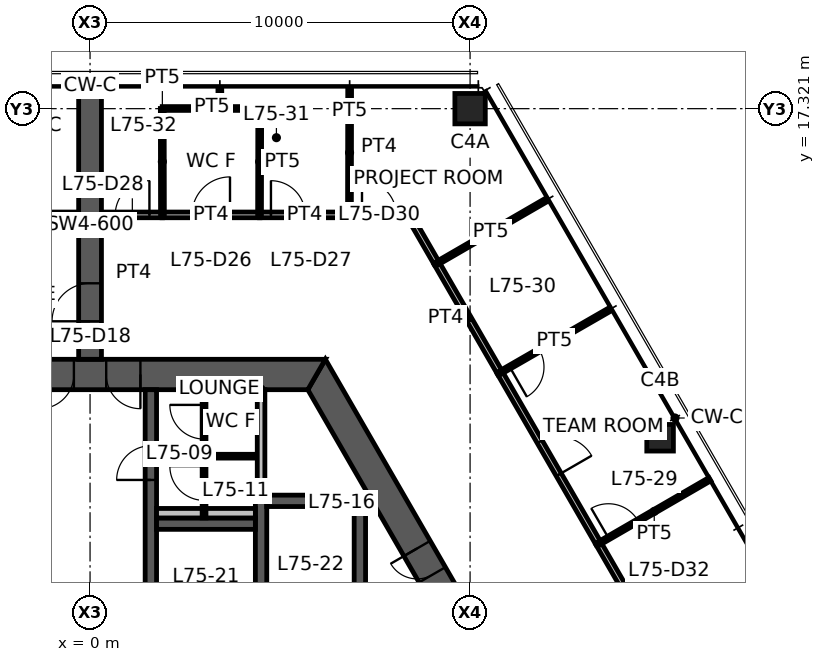
"""IFC4 building model, lengths in metres.
Left out: names, types, materials, properties, quantities, classifications, styles, units other than length and angle.
Written with IfcOpenShell. Run it as: python <this file> out.ifc"""

import sys

from ifc_helpers import new_model, si_unit, direction, frame, frame_2d, origin, origin_2d, place, context, subcontext, project, spatial, polyline, rectangle, hollow_rectangle, outline, extrude, element, fill, save


model = new_model("IFC4")
c1 = context("Model", 3, precision=1e-05, world=origin(), true_north=direction((0.0, 1.0)))
c2 = subcontext(c1, "Body", "Model", "MODEL_VIEW")
j1 = project(units=[si_unit("LENGTHUNIT", "METRE"), si_unit("PLANEANGLEUNIT", "RADIAN")], contexts=[c1])
p1 = place(None, origin())
s1 = spatial("IfcSite", under=j1, at=p1, CompositionType="ELEMENT")
p2 = place(p1, origin())
s2 = spatial("IfcBuilding", under=s1, at=p2, CompositionType="ELEMENT")
p3 = place(p2, frame((0.0, 0.0, 298.6)))
s3 = spatial("IfcBuildingStorey", under=s2, at=p3, CompositionType="ELEMENT", Elevation=298.6)
p4 = place(p3, frame((10.0, 17.321, 0.0), z_axis=(0.0, 0.0, 1.0), x_axis=(1.0, 0.0, 0.0)))
e1 = element("IfcColumn", 1, at=p4, inside=s3, PredefinedType="COLUMN", context=c2, shape_type="SweptSolid", body=[
    extrude(hollow_rectangle(XDim=0.8, YDim=0.8, WallThickness=0.04, at=origin_2d()), origin(), (0.0, 0.0, 1.0), 3.9),
])
p5 = place(p3, frame((15.0, 8.66, 0.0), z_axis=(0.0, 0.0, 1.0), x_axis=(1.0, 0.0, 0.0)))
e2 = element("IfcColumn", 2, at=p5, inside=s3, PredefinedType="COLUMN", context=c2, shape_type="SweptSolid", body=[
    extrude(hollow_rectangle(XDim=0.7, YDim=0.7, WallThickness=0.032, at=origin_2d()), origin(), (0.0, 0.0, 1.0), 3.9),
])
p6 = place(p3, frame((11.922, 0.0, 0.0), z_axis=(0.0, 0.0, 1.0), x_axis=(-0.500004296715, 0.866022923061, 0.0)))
e3 = element("IfcWall", 3, at=p6, inside=s3, PredefinedType="SHEAR", context=c2, shape_type="SweptSolid", body=[
    extrude(outline(polyline([(-0.231, -0.4), (5.835, -0.4), (6.635, -0.4), (12.153, -0.4), (11.691, 0.4), (6.635, 0.4), (5.835, 0.4), (0.231, 0.4), (-0.231, -0.4)])), origin(), (0.0, 0.0, 1.0), 3.9),
])
p7 = place(p6, frame((5.835, 0.0, 0.0)))
e4 = element("IfcOpeningElement", 4, at=p7, cuts=e3, PredefinedType="OPENING", context=c2, shape_type="SweptSolid", body=[
    extrude(rectangle(XDim=0.8, YDim=2.1, at=frame_2d((0.4, 1.05))), frame((0.0, 0.41, 0.0), z_axis=(0.0, -1.0, 0.0), x_axis=(1.0, 0.0, 0.0)), (0.0, 0.0, 1.0), 0.82),
])
p8 = place(p3, frame((5.961, 10.325, 0.0), z_axis=(0.0, 0.0, 1.0), x_axis=(-1.0, 0.0, 0.0)))
e5 = element("IfcWall", 5, at=p8, inside=s3, PredefinedType="SHEAR", context=c2, shape_type="SweptSolid", body=[
    extrude(outline(polyline([(-0.231, -0.4), (4.636, -0.4), (5.536, -0.4), (6.386, -0.4), (7.286, -0.4), (12.153, -0.4), (11.691, 0.4), (7.286, 0.4), (6.386, 0.4), (5.536, 0.4), (4.636, 0.4), (0.231, 0.4), (-0.231, -0.4)])), origin(), (0.0, 0.0, 1.0), 3.9),
])
p9 = place(p8, frame((6.386, 0.0, 0.0)))
e6 = element("IfcOpeningElement", 6, at=p9, cuts=e5, PredefinedType="OPENING", context=c2, shape_type="SweptSolid", body=[
    extrude(rectangle(XDim=0.9, YDim=2.1, at=frame_2d((0.45, 1.05))), frame((0.0, 0.41, 0.0), z_axis=(0.0, -1.0, 0.0), x_axis=(1.0, 0.0, 0.0)), (0.0, 0.0, 1.0), 0.82),
])
p10 = place(p8, frame((4.636, 0.0, 0.0)))
e7 = element("IfcOpeningElement", 7, at=p10, cuts=e5, PredefinedType="OPENING", context=c2, shape_type="SweptSolid", body=[
    extrude(rectangle(XDim=0.9, YDim=2.1, at=frame_2d((0.45, 1.05))), frame((0.0, 0.41, 0.0), z_axis=(0.0, -1.0, 0.0), x_axis=(1.0, 0.0, 0.0)), (0.0, 0.0, 1.0), 0.82),
])
p11 = place(p3, frame((0.0, 10.725, 0.0), z_axis=(0.0, 0.0, 1.0), x_axis=(0.0, 1.0, 0.0)))
e8 = element("IfcWall", 8, at=p11, inside=s3, PredefinedType="SHEAR", context=c2, shape_type="SweptSolid", body=[
    extrude(rectangle(XDim=7.045, YDim=0.6, at=frame_2d((3.523, 0.0))), origin(), (0.0, 0.0, 1.0), 3.9),
])
p12 = place(p11, frame((1.0, 0.0, 0.0)))
e9 = element("IfcOpeningElement", 9, at=p12, cuts=e8, PredefinedType="OPENING", context=c2, shape_type="SweptSolid", body=[
    extrude(rectangle(XDim=1.0, YDim=2.1, at=frame_2d((0.5, 1.05))), frame((0.0, 0.31, 0.0), z_axis=(0.0, -1.0, 0.0), x_axis=(1.0, 0.0, 0.0)), (0.0, 0.0, 1.0), 0.62),
])
p13 = place(p3, frame((1.6, 3.75, 0.0), z_axis=(0.0, 0.0, 1.0), x_axis=(0.0, 1.0, 0.0)))
e10 = element("IfcWall", 10, at=p13, inside=s3, PredefinedType="SHEAR", context=c2, shape_type="SweptSolid", body=[
    extrude(rectangle(XDim=6.175, YDim=0.3, at=frame_2d((3.087, 0.0))), origin(), (0.0, 0.0, 1.0), 3.9),
])
p14 = place(p13, frame((3.8, 0.0, 0.0)))
e11 = element("IfcOpeningElement", 11, at=p14, cuts=e10, PredefinedType="OPENING", context=c2, shape_type="SweptSolid", body=[
    extrude(rectangle(XDim=0.9, YDim=2.1, at=frame_2d((0.45, 1.05))), frame((0.0, 0.16, 0.0), z_axis=(0.0, -1.0, 0.0), x_axis=(1.0, 0.0, 0.0)), (0.0, 0.0, 1.0), 0.32),
])
p15 = place(p3, frame((4.5, 3.75, 0.0), z_axis=(0.0, 0.0, 1.0), x_axis=(0.0, 1.0, 0.0)))
e12 = element("IfcWall", 12, at=p15, inside=s3, PredefinedType="SHEAR", context=c2, shape_type="SweptSolid", body=[
    extrude(rectangle(XDim=3.4, YDim=0.3, at=frame_2d((1.7, 0.0))), origin(), (0.0, 0.0, 1.0), 3.9),
])
for number, where, z_axis, x_axis in (
    (13, (1.75, 6.4, 0.0), (0.0, 0.0, 1.0), (1.0, 0.0, 0.0)),
    (14, (4.65, 7.0, 0.0), (0.0, 0.0, 1.0), (1.0, 0.0, 0.0)),
):
    element("IfcWall", number, at=place(p3, frame(where, z_axis=z_axis, x_axis=x_axis)), inside=s3, PredefinedType="SHEAR", context=c2, shape_type="SweptSolid", body=[
        extrude(rectangle(XDim=2.6, YDim=0.3, at=frame_2d((1.3, 0.0))), origin(), (0.0, 0.0, 1.0), 3.9),
    ])
p16 = place(p3, frame((7.1, 3.75, 0.0), z_axis=(0.0, 0.0, 1.0), x_axis=(0.0, 1.0, 0.0)))
e15 = element("IfcWall", 15, at=p16, inside=s3, PredefinedType="SHEAR", context=c2, shape_type="SweptSolid", body=[
    extrude(rectangle(XDim=3.1, YDim=0.3, at=frame_2d((1.55, 0.0))), origin(), (0.0, 0.0, 1.0), 3.9),
])
p17 = place(p3, frame((4.5, 7.15, 0.0), z_axis=(0.0, 0.0, 1.0), x_axis=(0.0, 1.0, 0.0)))
e16 = element("IfcWall", 16, at=p17, inside=s3, PredefinedType="STANDARD", context=c2, shape_type="SweptSolid", body=[
    extrude(rectangle(XDim=2.775, YDim=0.2, at=frame_2d((1.388, 0.0))), origin(), (0.0, 0.0, 1.0), 3.9),
])
p18 = place(p3, frame((1.75, 6.675, 0.0), z_axis=(0.0, 0.0, 1.0), x_axis=(1.0, 0.0, 0.0)))
e17 = element("IfcWall", 17, at=p18, inside=s3, PredefinedType="PLUMBINGWALL", context=c2, shape_type="SweptSolid", body=[
    extrude(rectangle(XDim=2.6, YDim=0.25, at=frame_2d((1.3, 0.0))), origin(), (0.0, 0.0, 1.0), 3.9),
])
p19 = place(p3, frame((3.0, 6.55, 0.0), z_axis=(0.0, 0.0, 1.0), x_axis=(0.0, 1.0, 0.0)))
e18 = element("IfcWall", 18, at=p19, inside=s3, PredefinedType="PARTITIONING", context=c2, shape_type="SweptSolid", body=[
    extrude(rectangle(XDim=3.375, YDim=0.1, at=frame_2d((1.688, 0.0))), origin(), (0.0, 0.0, 1.0), 2.35),
])
p20 = place(p19, frame((2.075, 0.0, 0.0)))
e19 = element("IfcOpeningElement", 19, at=p20, cuts=e18, PredefinedType="OPENING", context=c2, shape_type="SweptSolid", body=[
    extrude(rectangle(XDim=0.9, YDim=2.1, at=frame_2d((0.45, 1.05))), frame((0.0, 0.06, 0.0), z_axis=(0.0, -1.0, 0.0), x_axis=(1.0, 0.0, 0.0)), (0.0, 0.0, 1.0), 0.12),
])
p21 = place(p19, frame((0.462, 0.0, 0.0)))
e20 = element("IfcOpeningElement", 20, at=p21, cuts=e18, PredefinedType="OPENING", context=c2, shape_type="SweptSolid", body=[
    extrude(rectangle(XDim=0.9, YDim=2.1, at=frame_2d((0.45, 1.05))), frame((0.0, 0.06, 0.0), z_axis=(0.0, -1.0, 0.0), x_axis=(1.0, 0.0, 0.0)), (0.0, 0.0, 1.0), 0.12),
])
p22 = place(p3, frame((3.05, 8.175, 0.0), z_axis=(0.0, 0.0, 1.0), x_axis=(1.0, 0.0, 0.0)))
e21 = element("IfcWall", 21, at=p22, inside=s3, PredefinedType="PARTITIONING", context=c2, shape_type="SweptSolid", body=[
    extrude(rectangle(XDim=1.3, YDim=0.1, at=frame_2d((0.65, 0.0))), origin(), (0.0, 0.0, 1.0), 2.35),
])
p23 = place(p3, frame((1.895, 14.525, 0.0), z_axis=(0.0, 0.0, 1.0), x_axis=(1.0, 0.0, 0.0)))
e22 = element("IfcWall", 22, at=p23, inside=s3, PredefinedType="PARTITIONING", context=c2, shape_type="SweptSolid", body=[
    extrude(rectangle(XDim=2.575, YDim=0.15, at=frame_2d((1.288, 0.0))), origin(), (0.0, 0.0, 1.0), 2.35),
])
p24 = place(p23, frame((0.788, 0.0, 0.0)))
e23 = element("IfcOpeningElement", 23, at=p24, cuts=e22, PredefinedType="OPENING", context=c2, shape_type="SweptSolid", body=[
    extrude(rectangle(XDim=1.0, YDim=2.1, at=frame_2d((0.5, 1.05))), frame((0.0, 0.085, 0.0), z_axis=(0.0, -1.0, 0.0), x_axis=(1.0, 0.0, 0.0)), (0.0, 0.0, 1.0), 0.17),
])
p25 = place(p3, frame((13.376, 5.882, 0.0), z_axis=(0.0, 0.0, 1.0), x_axis=(0.499991431567, -0.866030350715, 0.0)))
e24 = element("IfcWall", 24, at=p25, inside=s3, PredefinedType="PARTITIONING", context=c2, shape_type="SweptSolid", body=[
    extrude(rectangle(XDim=4.819, YDim=0.15, at=frame_2d((2.409, 0.0))), origin(), (0.0, 0.0, 1.0), 2.35),
])
p26 = place(p3, frame((9.119, 13.256, 0.0), z_axis=(0.0, 0.0, 1.0), x_axis=(0.499990242038, -0.866031037473, 0.0)))
e25 = element("IfcWall", 25, at=p26, inside=s3, PredefinedType="PARTITIONING", context=c2, shape_type="SweptSolid", body=[
    extrude(rectangle(XDim=3.341, YDim=0.15, at=frame_2d((1.67, 0.0))), origin(), (0.0, 0.0, 1.0), 2.35),
])
p27 = place(p3, frame((4.46, 14.525, 0.0), z_axis=(0.0, 0.0, 1.0), x_axis=(1.0, 0.0, 0.0)))
e26 = element("IfcWall", 26, at=p27, inside=s3, PredefinedType="PARTITIONING", context=c2, shape_type="SweptSolid", body=[
    extrude(rectangle(XDim=2.376, YDim=0.15, at=frame_2d((1.188, 0.0))), origin(), (0.0, 0.0, 1.0), 2.35),
])
p28 = place(p27, frame((0.3, 0.0, 0.0)))
e27 = element("IfcOpeningElement", 27, at=p28, cuts=e26, PredefinedType="OPENING", context=c2, shape_type="SweptSolid", body=[
    extrude(rectangle(XDim=0.9, YDim=2.1, at=frame_2d((0.45, 1.05))), frame((0.0, 0.085, 0.0), z_axis=(0.0, -1.0, 0.0), x_axis=(1.0, 0.0, 0.0)), (0.0, 0.0, 1.0), 0.17),
])
p29 = place(p3, frame((0.32, 14.525, 0.0), z_axis=(0.0, 0.0, 1.0), x_axis=(1.0, 0.0, 0.0)))
e28 = element("IfcWall", 28, at=p29, inside=s3, PredefinedType="PARTITIONING", context=c2, shape_type="SweptSolid", body=[
    extrude(rectangle(XDim=1.585, YDim=0.15, at=frame_2d((0.792, 0.0))), origin(), (0.0, 0.0, 1.0), 2.35),
])
p30 = place(p29, frame((0.343, 0.0, 0.0)))
e29 = element("IfcOpeningElement", 29, at=p30, cuts=e28, PredefinedType="OPENING", context=c2, shape_type="SweptSolid", body=[
    extrude(rectangle(XDim=0.9, YDim=2.1, at=frame_2d((0.45, 1.05))), frame((0.0, 0.085, 0.0), z_axis=(0.0, -1.0, 0.0), x_axis=(1.0, 0.0, 0.0)), (0.0, 0.0, 1.0), 0.17),
])
p31 = place(p3, frame((6.826, 14.525, 0.0), z_axis=(0.0, 0.0, 1.0), x_axis=(1.0, 0.0, 0.0)))
e30 = element("IfcWall", 30, at=p31, inside=s3, PredefinedType="PARTITIONING", context=c2, shape_type="SweptSolid", body=[
    extrude(rectangle(XDim=1.56, YDim=0.15, at=frame_2d((0.78, 0.0))), origin(), (0.0, 0.0, 1.0), 2.35),
])
p32 = place(p31, frame((0.33, 0.0, 0.0)))
e31 = element("IfcOpeningElement", 31, at=p32, cuts=e30, PredefinedType="OPENING", context=c2, shape_type="SweptSolid", body=[
    extrude(rectangle(XDim=0.9, YDim=2.1, at=frame_2d((0.45, 1.05))), frame((0.0, 0.085, 0.0), z_axis=(0.0, -1.0, 0.0), x_axis=(1.0, 0.0, 0.0)), (0.0, 0.0, 1.0), 0.17),
])
p33 = place(p3, frame((8.386, 14.525, 0.0), z_axis=(0.0, 0.0, 1.0), x_axis=(0.500090108003, -0.865973373654, 0.0)))
e32 = element("IfcWall", 32, at=p33, inside=s3, PredefinedType="PARTITIONING", context=c2, shape_type="SweptSolid", body=[
    extrude(rectangle(XDim=1.475, YDim=0.15, at=frame_2d((0.738, 0.0))), origin(), (0.0, 0.0, 1.0), 2.35),
])
p34 = place(p3, frame((10.785, 10.37, 0.0), z_axis=(0.0, 0.0, 1.0), x_axis=(0.499992432099, -0.86602977307, 0.0)))
e33 = element("IfcWall", 33, at=p34, inside=s3, PredefinedType="PARTITIONING", context=c2, shape_type="SweptSolid", body=[
    extrude(rectangle(XDim=5.192, YDim=0.15, at=frame_2d((2.596, 0.0))), origin(), (0.0, 0.0, 1.0), 2.35),
])
p35 = place(p34, frame((2.096, 0.0, 0.0)))
e34 = element("IfcOpeningElement", 34, at=p35, cuts=e33, PredefinedType="OPENING", context=c2, shape_type="SweptSolid", body=[
    extrude(rectangle(XDim=1.0, YDim=2.1, at=frame_2d((0.5, 1.05))), frame((0.0, 0.085, 0.0), z_axis=(0.0, -1.0, 0.0), x_axis=(1.0, 0.0, 0.0)), (0.0, 0.0, 1.0), 0.17),
])
p36 = place(p3, frame((3.41, 17.325, 0.0), z_axis=(0.0, 0.0, 1.0), x_axis=(1.0, 0.0, 0.0)))
e35 = element("IfcWall", 35, at=p36, inside=s3, PredefinedType="PARTITIONING", context=c2, shape_type="SweptSolid", body=[
    extrude(rectangle(XDim=1.055, YDim=0.1, at=frame_2d((0.527, 0.0))), origin(), (0.0, 0.0, 1.0), 2.35),
])
p37 = place(p3, frame((4.465, 17.325, 0.0), z_axis=(0.0, 0.0, 1.0), x_axis=(-0.001831019688, -0.999998323682, 0.0)))
e36 = element("IfcWall", 36, at=p37, inside=s3, PredefinedType="PARTITIONING", context=c2, shape_type="SweptSolid", body=[
    extrude(rectangle(XDim=2.8, YDim=0.1, at=frame_2d((1.4, 0.0))), origin(), (0.0, 0.0, 1.0), 2.35),
])
p38 = place(p3, frame((1.9, 17.325, 0.0), z_axis=(0.0, 0.0, 1.0), x_axis=(1.0, 0.0, 0.0)))
e37 = element("IfcWall", 37, at=p38, inside=s3, PredefinedType="PARTITIONING", context=c2, shape_type="SweptSolid", body=[
    extrude(rectangle(XDim=1.521, YDim=0.1, at=frame_2d((0.76, 0.0))), origin(), (0.0, 0.0, 1.0), 2.35),
])
p39 = place(p3, frame((1.905, 14.525, 0.0), z_axis=(0.0, 0.0, 1.0), x_axis=(-0.001831019688, 0.999998323682, 0.0)))
e38 = element("IfcWall", 38, at=p39, inside=s3, PredefinedType="PARTITIONING", context=c2, shape_type="SweptSolid", body=[
    extrude(rectangle(XDim=2.8, YDim=0.1, at=frame_2d((1.4, 0.0))), origin(), (0.0, 0.0, 1.0), 2.35),
])
p40 = place(p3, frame((13.381, 5.874, 0.0), z_axis=(0.0, 0.0, 1.0), x_axis=(0.865294595383, 0.501263666348, 0.0)))
e39 = element("IfcWall", 39, at=p40, inside=s3, PredefinedType="PARTITIONING", context=c2, shape_type="SweptSolid", body=[
    extrude(rectangle(XDim=3.385, YDim=0.1, at=frame_2d((1.693, 0.0))), origin(), (0.0, 0.0, 1.0), 2.35),
])
p41 = place(p40, frame((0.3, 0.0, 0.0)))
e40 = element("IfcOpeningElement", 40, at=p41, cuts=e39, PredefinedType="OPENING", context=c2, shape_type="SweptSolid", body=[
    extrude(rectangle(XDim=0.9, YDim=2.1, at=frame_2d((0.45, 1.05))), frame((0.0, 0.06, 0.0), z_axis=(0.0, -1.0, 0.0), x_axis=(1.0, 0.0, 0.0)), (0.0, 0.0, 1.0), 0.12),
])
p42 = place(p3, frame((9.124, 13.247, 0.0), z_axis=(0.0, 0.0, 1.0), x_axis=(0.865292288087, 0.501267649243, 0.0)))
e41 = element("IfcWall", 41, at=p42, inside=s3, PredefinedType="PARTITIONING", context=c2, shape_type="SweptSolid", body=[
    extrude(rectangle(XDim=3.286, YDim=0.1, at=frame_2d((1.643, 0.0))), origin(), (0.0, 0.0, 1.0), 2.35),
])
p43 = place(p3, frame((13.654, 12.022, 0.0), z_axis=(0.0, 0.0, 1.0), x_axis=(-0.866613759554, -0.498979550434, 0.0)))
e42 = element("IfcWall", 42, at=p43, inside=s3, PredefinedType="PARTITIONING", context=c2, shape_type="SweptSolid", body=[
    extrude(rectangle(XDim=3.311, YDim=0.1, at=frame_2d((1.655, 0.0))), origin(), (0.0, 0.0, 1.0), 2.35),
])
p44 = place(p43, frame((2.11, 0.0, 0.0)))
e43 = element("IfcOpeningElement", 43, at=p44, cuts=e42, PredefinedType="OPENING", context=c2, shape_type="SweptSolid", body=[
    extrude(rectangle(XDim=0.9, YDim=2.1, at=frame_2d((0.45, 1.05))), frame((0.0, 0.06, 0.0), z_axis=(0.0, -1.0, 0.0), x_axis=(1.0, 0.0, 0.0)), (0.0, 0.0, 1.0), 0.12),
])
p45 = place(p3, frame((3.42, 17.325, 0.0), z_axis=(0.0, 0.0, 1.0), x_axis=(-0.010266399375, 0.999947299133, 0.0)))
e44 = element("IfcWall", 44, at=p45, inside=s3, PredefinedType="PARTITIONING", context=c2, shape_type="SweptSolid", body=[
    extrude(rectangle(XDim=0.476, YDim=0.1, at=frame_2d((0.238, 0.0))), origin(), (0.0, 0.0, 1.0), 2.35),
])
p46 = place(p3, frame((6.831, 17.801, 0.0), z_axis=(0.0, 0.0, 1.0), x_axis=(-0.001490644539, -0.999998888989, 0.0)))
e45 = element("IfcWall", 45, at=p46, inside=s3, PredefinedType="PARTITIONING", context=c2, shape_type="SweptSolid", body=[
    extrude(rectangle(XDim=3.276, YDim=0.1, at=frame_2d((1.638, 0.0))), origin(), (0.0, 0.0, 1.0), 2.35),
])
p47 = place(p3, frame((-4.47, 14.525, 0.0), z_axis=(0.0, 0.0, 1.0), x_axis=(1.0, 0.0, 0.0)))
e46 = element("IfcWall", 46, at=p47, inside=s3, PredefinedType="PARTITIONING", context=c2, shape_type="SweptSolid", body=[
    extrude(rectangle(XDim=4.15, YDim=0.15, at=frame_2d((2.075, 0.0))), origin(), (0.0, 0.0, 1.0), 2.35),
])
p48 = place(p47, frame((1.575, 0.0, 0.0)))
e47 = element("IfcOpeningElement", 47, at=p48, cuts=e46, PredefinedType="OPENING", context=c2, shape_type="SweptSolid", body=[
    extrude(rectangle(XDim=1.0, YDim=2.1, at=frame_2d((0.5, 1.05))), frame((0.0, 0.085, 0.0), z_axis=(0.0, -1.0, 0.0), x_axis=(1.0, 0.0, 0.0)), (0.0, 0.0, 1.0), 0.17),
])
p49 = place(p3, frame((0.0, 17.771, 0.0), z_axis=(0.0, 0.0, 1.0), x_axis=(0.0, 1.0, 0.0)))
e48 = element("IfcWall", 48, at=p49, inside=s3, PredefinedType="PARTITIONING", context=c2, shape_type="SweptSolid", body=[
    extrude(rectangle(XDim=0.065, YDim=0.175, at=frame_2d((0.032, 0.0))), origin(), (0.0, 0.0, 1.0), 3.9),
])
p50 = place(p9, origin())
e49 = element("IfcDoor", 49, at=p50, inside=s3, OperationType="SINGLE_SWING_RIGHT", PredefinedType="DOOR", context=c2, shape_type="SweptSolid", body=[
    extrude(rectangle(XDim=0.9, YDim=2.1, at=frame_2d((0.45, 1.05))), frame((0.0, 0.025, 0.0), z_axis=(0.0, -1.0, 0.0), x_axis=(1.0, 0.0, 0.0)), (0.0, 0.0, 1.0), 0.05),
])
fill(e6, e49)
p51 = place(p10, origin())
e50 = element("IfcDoor", 50, at=p51, inside=s3, OperationType="SINGLE_SWING_LEFT", PredefinedType="DOOR", context=c2, shape_type="SweptSolid", body=[
    extrude(rectangle(XDim=0.9, YDim=2.1, at=frame_2d((0.45, 1.05))), frame((0.0, 0.025, 0.0), z_axis=(0.0, -1.0, 0.0), x_axis=(1.0, 0.0, 0.0)), (0.0, 0.0, 1.0), 0.05),
])
fill(e7, e50)
p52 = place(p7, origin())
e51 = element("IfcDoor", 51, at=p52, inside=s3, OperationType="SINGLE_SWING_RIGHT", PredefinedType="DOOR", context=c2, shape_type="SweptSolid", body=[
    extrude(rectangle(XDim=0.8, YDim=2.1, at=frame_2d((0.4, 1.05))), frame((0.0, 0.025, 0.0), z_axis=(0.0, -1.0, 0.0), x_axis=(1.0, 0.0, 0.0)), (0.0, 0.0, 1.0), 0.05),
])
fill(e4, e51)
p53 = place(p14, origin())
e52 = element("IfcDoor", 52, at=p53, inside=s3, OperationType="SINGLE_SWING_LEFT", PredefinedType="DOOR", context=c2, shape_type="SweptSolid", body=[
    extrude(rectangle(XDim=0.9, YDim=2.1, at=frame_2d((0.45, 1.05))), frame((0.0, 0.025, 0.0), z_axis=(0.0, -1.0, 0.0), x_axis=(1.0, 0.0, 0.0)), (0.0, 0.0, 1.0), 0.05),
])
fill(e11, e52)
p54 = place(p12, origin())
e53 = element("IfcDoor", 53, at=p54, inside=s3, OperationType="SINGLE_SWING_LEFT", PredefinedType="DOOR", context=c2, shape_type="SweptSolid", body=[
    extrude(rectangle(XDim=1.0, YDim=2.1, at=frame_2d((0.5, 1.05))), frame((0.0, 0.025, 0.0), z_axis=(0.0, -1.0, 0.0), x_axis=(1.0, 0.0, 0.0)), (0.0, 0.0, 1.0), 0.05),
])
fill(e9, e53)
p55 = place(p20, origin())
e54 = element("IfcDoor", 54, at=p55, inside=s3, OperationType="SINGLE_SWING_RIGHT", PredefinedType="DOOR", context=c2, shape_type="SweptSolid", body=[
    extrude(rectangle(XDim=0.9, YDim=2.1, at=frame_2d((0.45, 1.05))), frame((0.0, 0.025, 0.0), z_axis=(0.0, -1.0, 0.0), x_axis=(1.0, 0.0, 0.0)), (0.0, 0.0, 1.0), 0.05),
])
fill(e19, e54)
p56 = place(p21, origin())
e55 = element("IfcDoor", 55, at=p56, inside=s3, OperationType="SINGLE_SWING_RIGHT", PredefinedType="DOOR", context=c2, shape_type="SweptSolid", body=[
    extrude(rectangle(XDim=0.9, YDim=2.1, at=frame_2d((0.45, 1.05))), frame((0.0, 0.025, 0.0), z_axis=(0.0, -1.0, 0.0), x_axis=(1.0, 0.0, 0.0)), (0.0, 0.0, 1.0), 0.05),
])
fill(e20, e55)
p57 = place(p24, origin())
e56 = element("IfcDoor", 56, at=p57, inside=s3, OperationType="SINGLE_SWING_RIGHT", PredefinedType="DOOR", context=c2, shape_type="SweptSolid", body=[
    extrude(rectangle(XDim=1.0, YDim=2.1, at=frame_2d((0.5, 1.05))), frame((0.0, 0.025, 0.0), z_axis=(0.0, -1.0, 0.0), x_axis=(1.0, 0.0, 0.0)), (0.0, 0.0, 1.0), 0.05),
])
fill(e23, e56)
p58 = place(p28, origin())
e57 = element("IfcDoor", 57, at=p58, inside=s3, OperationType="SINGLE_SWING_LEFT", PredefinedType="DOOR", context=c2, shape_type="SweptSolid", body=[
    extrude(rectangle(XDim=0.9, YDim=2.1, at=frame_2d((0.45, 1.05))), frame((0.0, 0.025, 0.0), z_axis=(0.0, -1.0, 0.0), x_axis=(1.0, 0.0, 0.0)), (0.0, 0.0, 1.0), 0.05),
])
fill(e27, e57)
p59 = place(p30, origin())
e58 = element("IfcDoor", 58, at=p59, inside=s3, OperationType="SINGLE_SWING_RIGHT", PredefinedType="DOOR", context=c2, shape_type="SweptSolid", body=[
    extrude(rectangle(XDim=0.9, YDim=2.1, at=frame_2d((0.45, 1.05))), frame((0.0, 0.025, 0.0), z_axis=(0.0, -1.0, 0.0), x_axis=(1.0, 0.0, 0.0)), (0.0, 0.0, 1.0), 0.05),
])
fill(e29, e58)
p60 = place(p32, origin())
e59 = element("IfcDoor", 59, at=p60, inside=s3, OperationType="SINGLE_SWING_LEFT", PredefinedType="DOOR", context=c2, shape_type="SweptSolid", body=[
    extrude(rectangle(XDim=0.9, YDim=2.1, at=frame_2d((0.45, 1.05))), frame((0.0, 0.025, 0.0), z_axis=(0.0, -1.0, 0.0), x_axis=(1.0, 0.0, 0.0)), (0.0, 0.0, 1.0), 0.05),
])
fill(e31, e59)
p61 = place(p35, origin())
e60 = element("IfcDoor", 60, at=p61, inside=s3, OperationType="SINGLE_SWING_RIGHT", PredefinedType="DOOR", context=c2, shape_type="SweptSolid", body=[
    extrude(rectangle(XDim=1.0, YDim=2.1, at=frame_2d((0.5, 1.05))), frame((0.0, 0.025, 0.0), z_axis=(0.0, -1.0, 0.0), x_axis=(1.0, 0.0, 0.0)), (0.0, 0.0, 1.0), 0.05),
])
fill(e34, e60)
p62 = place(p41, origin())
e61 = element("IfcDoor", 61, at=p62, inside=s3, OperationType="SINGLE_SWING_LEFT", PredefinedType="DOOR", context=c2, shape_type="SweptSolid", body=[
    extrude(rectangle(XDim=0.9, YDim=2.1, at=frame_2d((0.45, 1.05))), frame((0.0, 0.025, 0.0), z_axis=(0.0, -1.0, 0.0), x_axis=(1.0, 0.0, 0.0)), (0.0, 0.0, 1.0), 0.05),
])
fill(e40, e61)
p63 = place(p44, origin())
e62 = element("IfcDoor", 62, at=p63, inside=s3, OperationType="SINGLE_SWING_RIGHT", PredefinedType="DOOR", context=c2, shape_type="SweptSolid", body=[
    extrude(rectangle(XDim=0.9, YDim=2.1, at=frame_2d((0.45, 1.05))), frame((0.0, 0.025, 0.0), z_axis=(0.0, -1.0, 0.0), x_axis=(1.0, 0.0, 0.0)), (0.0, 0.0, 1.0), 0.05),
])
fill(e43, e62)
save(model, sys.argv[1])
